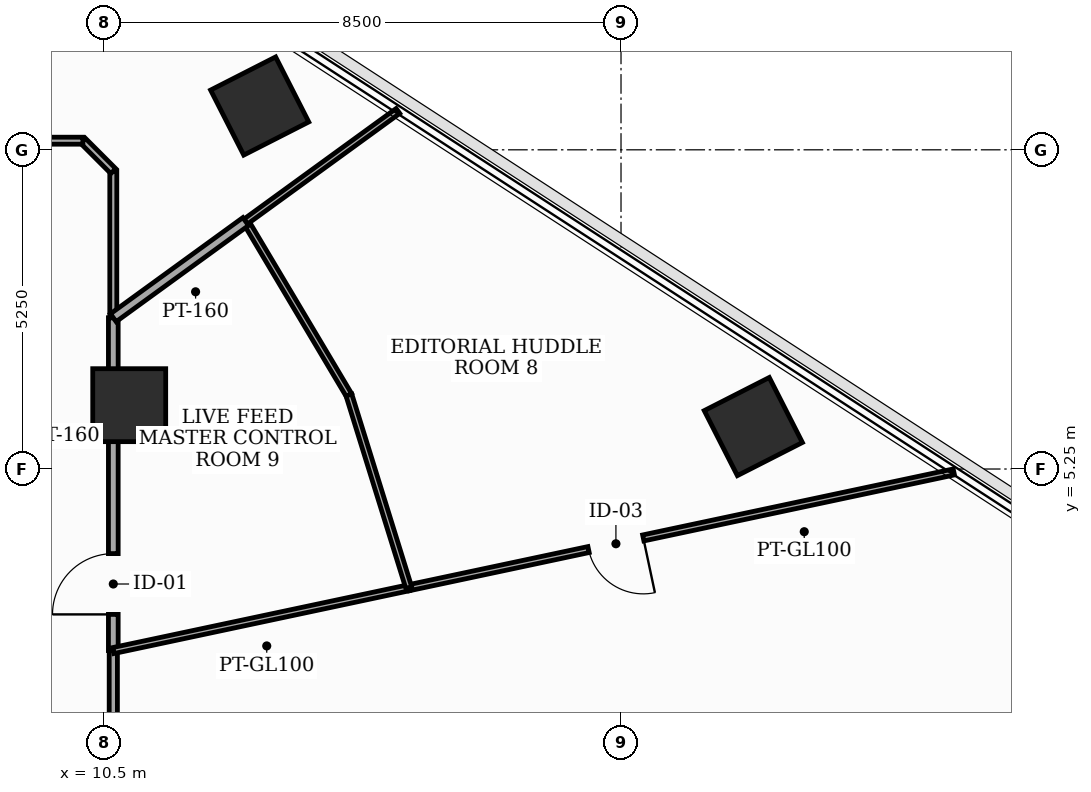
"""IFC4 building model, lengths in metres.
Left out: names, types, materials, properties, quantities, classifications, styles, units other than length and angle.
Written with IfcOpenShell. Run it as: python <this file> out.ifc"""

import sys

from ifc_helpers import new_model, si_unit, direction, frame, frame_2d, origin, origin_2d, place, context, subcontext, project, spatial, rectangle, extrude, element, fill, save


model = new_model("IFC4")
c1 = context("Model", 3, precision=1e-05, world=origin(), true_north=direction((0.0, 1.0)))
c2 = subcontext(c1, "Body", "Model", "MODEL_VIEW")
j1 = project(units=[si_unit("LENGTHUNIT", "METRE"), si_unit("PLANEANGLEUNIT", "RADIAN")], contexts=[c1])
p1 = place(None, origin())
s1 = spatial("IfcSite", under=j1, at=p1, CompositionType="ELEMENT")
p2 = place(p1, origin())
s2 = spatial("IfcBuilding", under=s1, at=p2, CompositionType="ELEMENT")
p3 = place(p2, frame((0.0, 0.0, 145.8)))
s3 = spatial("IfcBuildingStorey", under=s2, at=p3, CompositionType="ELEMENT", Elevation=145.8)
for number, where, z_axis, x_axis in (
    (1, (10.912, 6.3, 0.0), (0.0, 0.0, 1.0), (1.0, 0.0, 0.0)),
    (2, (21.176, 5.948, 0.0), (0.0, 0.0, 1.0), (0.891, 0.454, 0.0)),
    (3, (13.058, 11.22, 0.0), (0.0, 0.0, 1.0), (0.891, 0.454, 0.0)),
):
    element("IfcColumn", number, at=place(p3, frame(where, z_axis=z_axis, x_axis=x_axis)), inside=s3, PredefinedType="COLUMN", context=c2, shape_type="SweptSolid", body=[
        extrude(rectangle(XDim=1.2, YDim=1.2, at=origin_2d()), origin(), (0.0, 0.0, 1.0), 3.7),
    ])
p4 = place(p3, frame((10.65, -4.742, 0.0), z_axis=(0.0, 0.0, 1.0), x_axis=(0.0, 1.0, 0.0)))
e4 = element("IfcWall", 4, at=p4, inside=s3, PredefinedType="PARTITIONING", context=c2, shape_type="SweptSolid", body=[
    extrude(rectangle(XDim=7.006, YDim=0.135, at=frame_2d((3.503, 0.0))), origin(), (0.0, 0.0, 1.0), 2.745),
])
p5 = place(p4, frame((1.862, 0.0, 0.0)))
e5 = element("IfcOpeningElement", 5, at=p5, cuts=e4, PredefinedType="OPENING", context=c2, shape_type="SweptSolid", body=[
    extrude(rectangle(XDim=1.6, YDim=2.15, at=frame_2d((0.8, 1.075))), frame((0.0, 0.077, 0.0), z_axis=(0.0, -1.0, 0.0), x_axis=(1.0, 0.0, 0.0)), (0.0, 0.0, 1.0), 0.155),
])
p6 = place(p3, frame((10.65, 2.264, 0.0), z_axis=(0.0, 0.0, 1.0), x_axis=(0.0, 1.0, 0.0)))
e6 = element("IfcWall", 6, at=p6, inside=s3, PredefinedType="PARTITIONING", context=c2, shape_type="SweptSolid", body=[
    extrude(rectangle(XDim=5.474, YDim=0.16, at=frame_2d((2.737, 0.0))), origin(), (0.0, 0.0, 1.0), 2.045),
])
p7 = place(p6, frame((0.595, 0.0, 0.0)))
e7 = element("IfcOpeningElement", 7, at=p7, cuts=e6, PredefinedType="OPENING", context=c2, shape_type="SweptSolid", body=[
    extrude(rectangle(XDim=1.0, YDim=2.0, at=frame_2d((0.5, 1.0))), frame((0.0, 0.09, 0.0), z_axis=(0.0, -1.0, 0.0), x_axis=(1.0, 0.0, 0.0)), (0.0, 0.0, 1.0), 0.18),
])
p8 = place(p3, frame((10.65, 7.738, 0.0), z_axis=(0.0, 0.0, 1.0), x_axis=(0.0, 1.0, 0.0)))
e8 = element("IfcWall", 8, at=p8, inside=s3, PredefinedType="PARTITIONING", context=c2, shape_type="SweptSolid", body=[
    extrude(rectangle(XDim=2.412, YDim=0.115, at=frame_2d((1.206, 0.0))), origin(), (0.0, 0.0, 1.0), 3.46),
])
p9 = place(p3, frame((10.65, 10.15, 0.0), z_axis=(0.0, 0.0, 1.0), x_axis=(-0.707106781187, 0.707106781187, 0.0)))
e9 = element("IfcWall", 9, at=p9, inside=s3, PredefinedType="PARTITIONING", context=c2, shape_type="SweptSolid", body=[
    extrude(rectangle(XDim=0.707, YDim=0.115, at=frame_2d((0.354, 0.0))), origin(), (0.0, 0.0, 1.0), 3.46),
])
p10 = place(p3, frame((10.15, 10.65, 0.0), z_axis=(0.0, 0.0, 1.0), x_axis=(-1.0, 0.0, 0.0)))
e10 = element("IfcWall", 10, at=p10, inside=s3, PredefinedType="PARTITIONING", context=c2, shape_type="SweptSolid", body=[
    extrude(rectangle(XDim=5.408, YDim=0.115, at=frame_2d((2.704, 0.0))), origin(), (0.0, 0.0, 1.0), 2.045),
])
p11 = place(p10, frame((0.607, 0.0, 0.0)))
e11 = element("IfcOpeningElement", 11, at=p11, cuts=e10, PredefinedType="OPENING", context=c2, shape_type="SweptSolid", body=[
    extrude(rectangle(XDim=0.95, YDim=2.0, at=frame_2d((0.475, 1.0))), frame((0.0, 0.067, 0.0), z_axis=(0.0, -1.0, 0.0), x_axis=(1.0, 0.0, 0.0)), (0.0, 0.0, 1.0), 0.135),
])
p12 = place(p3, frame((24.474, 5.202, 0.0), z_axis=(0.0, 0.0, 1.0), x_axis=(-0.978158512366, -0.207860348999, 0.0)))
e12 = element("IfcWall", 12, at=p12, inside=s3, PredefinedType="MOVABLE", context=c2, shape_type="SweptSolid", body=[
    extrude(rectangle(XDim=9.164, YDim=0.1, at=frame_2d((4.582, 0.0))), origin(), (0.0, 0.0, 1.0), 2.045),
])
p13 = place(p12, frame((5.221, 0.0, 0.0)))
e13 = element("IfcOpeningElement", 13, at=p13, cuts=e12, PredefinedType="OPENING", context=c2, shape_type="SweptSolid", body=[
    extrude(rectangle(XDim=0.92, YDim=2.0, at=frame_2d((0.46, 1.0))), frame((0.0, 0.06, 0.0), z_axis=(0.0, -1.0, 0.0), x_axis=(1.0, 0.0, 0.0)), (0.0, 0.0, 1.0), 0.12),
])
p14 = place(p3, frame((15.51, 3.297, 0.0), z_axis=(0.0, 0.0, 1.0), x_axis=(-0.97814123971, -0.207941614832, 0.0)))
e14 = element("IfcWall", 14, at=p14, inside=s3, PredefinedType="MOVABLE", context=c2, shape_type="SweptSolid", body=[
    extrude(rectangle(XDim=4.969, YDim=0.1, at=frame_2d((2.484, 0.0))), origin(), (0.0, 0.0, 1.0), 2.745),
])
for number, where, z_axis, x_axis in (
    (15, (12.828, 9.32, 0.0), (0.0, 0.0, 1.0), (0.511, -0.859, 0.0)),
    (16, (14.525, 6.467, 0.0), (0.0, 0.0, 1.0), (0.297, -0.955, 0.0)),
):
    element("IfcWall", number, at=place(p3, frame(where, z_axis=z_axis, x_axis=x_axis)), inside=s3, PredefinedType="MOVABLE", context=c2, shape_type="SweptSolid", body=[
        extrude(rectangle(XDim=3.32, YDim=0.1, at=frame_2d((1.66, 0.0))), origin(), (0.0, 0.0, 1.0), 2.045),
    ])
p15 = place(p3, frame((15.331, 11.139, 0.0), z_axis=(0.0, 0.0, 1.0), x_axis=(-0.809015759361, -0.58778695214, 0.0)))
e17 = element("IfcWall", 17, at=p15, inside=s3, PredefinedType="MOVABLE", context=c2, shape_type="SweptSolid", body=[
    extrude(rectangle(XDim=3.094, YDim=0.1, at=frame_2d((1.547, 0.0))), origin(), (0.0, 0.0, 1.0), 2.045),
])
p16 = place(p3, frame((12.828, 9.32, 0.0), z_axis=(0.0, 0.0, 1.0), x_axis=(-0.809081072469, -0.587697046251, 0.0)))
e18 = element("IfcWall", 18, at=p16, inside=s3, PredefinedType="PARTITIONING", context=c2, shape_type="SweptSolid", body=[
    extrude(rectangle(XDim=2.692, YDim=0.16, at=frame_2d((1.346, 0.0))), origin(), (0.0, 0.0, 1.0), 2.045),
])
p17 = place(p7, origin())
e19 = element("IfcDoor", 19, at=p17, inside=s3, OperationType="SINGLE_SWING_LEFT", PredefinedType="DOOR", context=c2, shape_type="SweptSolid", body=[
    extrude(rectangle(XDim=1.0, YDim=2.0, at=frame_2d((0.5, 1.0))), frame((0.0, 0.025, 0.0), z_axis=(0.0, -1.0, 0.0), x_axis=(1.0, 0.0, 0.0)), (0.0, 0.0, 1.0), 0.05),
])
fill(e7, e19)
p18 = place(p13, origin())
e20 = element("IfcDoor", 20, at=p18, inside=s3, OperationType="SINGLE_SWING_LEFT", PredefinedType="DOOR", context=c2, shape_type="SweptSolid", body=[
    extrude(rectangle(XDim=0.92, YDim=2.0, at=frame_2d((0.46, 1.0))), frame((0.0, 0.025, 0.0), z_axis=(0.0, -1.0, 0.0), x_axis=(1.0, 0.0, 0.0)), (0.0, 0.0, 1.0), 0.05),
])
fill(e13, e20)
save(model, sys.argv[1])
